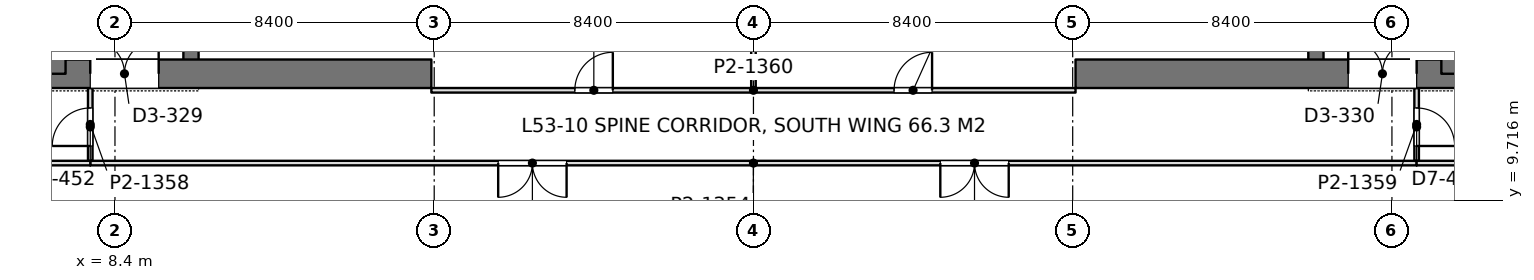
"""IFC4 building model, lengths in metres.
Left out: names, types, materials, properties, quantities, classifications, styles, units other than length and angle.
Written with IfcOpenShell. Run it as: python <this file> out.ifc"""

import sys

from ifc_helpers import new_model, si_unit, direction, frame, frame_2d, origin, place, context, subcontext, project, spatial, rectangle, extrude, element, fill, save


model = new_model("IFC4")
c1 = context("Model", 3, precision=1e-05, world=origin(), true_north=direction((0.0, 1.0)))
c2 = subcontext(c1, "Body", "Model", "MODEL_VIEW")
j1 = project(units=[si_unit("LENGTHUNIT", "METRE"), si_unit("PLANEANGLEUNIT", "RADIAN")], contexts=[c1])
p1 = place(None, origin())
s1 = spatial("IfcSite", under=j1, at=p1, CompositionType="ELEMENT")
p2 = place(p1, origin())
s2 = spatial("IfcBuilding", under=s1, at=p2, CompositionType="ELEMENT")
p3 = place(p2, frame((0.0, 0.0, 232.2)))
s3 = spatial("IfcBuildingStorey", under=s2, at=p3, CompositionType="ELEMENT", Elevation=232.2)
p4 = place(p3, frame((-1.125, 13.05, 0.0), z_axis=(0.0, 0.0, 1.0), x_axis=(1.0, 0.0, 0.0)))
e1 = element("IfcWall", 1, at=p4, inside=s3, PredefinedType="SHEAR", context=c2, shape_type="SweptSolid", body=[
    extrude(rectangle(XDim=17.85, YDim=0.75, at=frame_2d((8.925, 0.0))), origin(), (0.0, 0.0, 1.0), 4.2),
])
p5 = place(p4, frame((8.875, 0.0, 0.0)))
e2 = element("IfcOpeningElement", 2, at=p5, cuts=e1, PredefinedType="OPENING", context=c2, shape_type="SweptSolid", body=[
    extrude(rectangle(XDim=1.8, YDim=2.4, at=frame_2d((0.9, 1.2))), frame((0.0, 0.385, 0.0), z_axis=(0.0, -1.0, 0.0), x_axis=(1.0, 0.0, 0.0)), (0.0, 0.0, 1.0), 0.77),
])
p6 = place(p3, frame((6.9, 13.05, 0.0), z_axis=(0.0, 0.0, 1.0), x_axis=(0.0, 1.0, 0.0)))
e3 = element("IfcWall", 3, at=p6, inside=s3, PredefinedType="SHEAR", context=c2, shape_type="SweptSolid", body=[
    extrude(rectangle(XDim=24.3, YDim=0.4, at=frame_2d((12.15, 0.0))), origin(), (0.0, 0.0, 1.0), 4.2),
])
p7 = place(p6, frame((1.3, 0.0, 0.0)))
e4 = element("IfcOpeningElement", 4, at=p7, cuts=e3, PredefinedType="OPENING", context=c2, shape_type="SweptSolid", body=[
    extrude(rectangle(XDim=1.0, YDim=2.2, at=frame_2d((0.5, 1.1))), frame((0.0, 0.21, 0.0), z_axis=(0.0, -1.0, 0.0), x_axis=(1.0, 0.0, 0.0)), (0.0, 0.0, 1.0), 0.42),
])
p8 = place(p6, frame((22.0, 0.0, 0.0)))
e5 = element("IfcOpeningElement", 5, at=p8, cuts=e3, PredefinedType="OPENING", context=c2, shape_type="SweptSolid", body=[
    extrude(rectangle(XDim=1.0, YDim=2.2, at=frame_2d((0.5, 1.1))), frame((0.0, 0.21, 0.0), z_axis=(0.0, -1.0, 0.0), x_axis=(1.0, 0.0, 0.0)), (0.0, 0.0, 1.0), 0.42),
])
p9 = place(p6, frame((5.55, 0.0, 0.0)))
e6 = element("IfcOpeningElement", 6, at=p9, cuts=e3, PredefinedType="OPENING", context=c2, shape_type="SweptSolid", body=[
    extrude(rectangle(XDim=1.0, YDim=2.2, at=frame_2d((0.5, 1.1))), frame((0.0, 0.21, 0.0), z_axis=(0.0, -1.0, 0.0), x_axis=(1.0, 0.0, 0.0)), (0.0, 0.0, 1.0), 0.42),
])
p10 = place(p6, frame((9.55, 0.0, 0.0)))
e7 = element("IfcOpeningElement", 7, at=p10, cuts=e3, PredefinedType="OPENING", context=c2, shape_type="SweptSolid", body=[
    extrude(rectangle(XDim=1.0, YDim=2.2, at=frame_2d((0.5, 1.1))), frame((0.0, 0.21, 0.0), z_axis=(0.0, -1.0, 0.0), x_axis=(1.0, 0.0, 0.0)), (0.0, 0.0, 1.0), 0.42),
])
p11 = place(p6, frame((12.8, 0.0, 0.0)))
e8 = element("IfcOpeningElement", 8, at=p11, cuts=e3, PredefinedType="OPENING", context=c2, shape_type="SweptSolid", body=[
    extrude(rectangle(XDim=1.1, YDim=2.2, at=frame_2d((0.55, 1.1))), frame((0.0, 0.21, 0.0), z_axis=(0.0, -1.0, 0.0), x_axis=(1.0, 0.0, 0.0)), (0.0, 0.0, 1.0), 0.42),
])
p12 = place(p6, frame((15.538, 0.0, 0.0)))
e9 = element("IfcOpeningElement", 9, at=p12, cuts=e3, PredefinedType="OPENING", context=c2, shape_type="SweptSolid", body=[
    extrude(rectangle(XDim=1.1, YDim=2.2, at=frame_2d((0.55, 1.1))), frame((0.0, 0.21, 0.0), z_axis=(0.0, -1.0, 0.0), x_axis=(1.0, 0.0, 0.0)), (0.0, 0.0, 1.0), 0.42),
])
p13 = place(p6, frame((18.262, 0.0, 0.0)))
e10 = element("IfcOpeningElement", 10, at=p13, cuts=e3, PredefinedType="OPENING", context=c2, shape_type="SweptSolid", body=[
    extrude(rectangle(XDim=1.1, YDim=2.2, at=frame_2d((0.55, 1.1))), frame((0.0, 0.21, 0.0), z_axis=(0.0, -1.0, 0.0), x_axis=(1.0, 0.0, 0.0)), (0.0, 0.0, 1.0), 0.42),
])
p14 = place(p3, frame((10.4, 13.05, 0.0), z_axis=(0.0, 0.0, 1.0), x_axis=(0.0, 1.0, 0.0)))
e11 = element("IfcWall", 11, at=p14, inside=s3, PredefinedType="SHEAR", context=c2, shape_type="SweptSolid", body=[
    extrude(rectangle(XDim=24.3, YDim=0.4, at=frame_2d((12.15, 0.0))), origin(), (0.0, 0.0, 1.0), 4.2),
])
p15 = place(p14, frame((15.75, 0.0, 0.0)))
e12 = element("IfcOpeningElement", 12, at=p15, cuts=e11, PredefinedType="OPENING", context=c2, shape_type="SweptSolid", body=[
    extrude(rectangle(XDim=1.1, YDim=2.2, at=frame_2d((0.55, 1.1))), frame((0.0, 0.21, 0.0), z_axis=(0.0, -1.0, 0.0), x_axis=(1.0, 0.0, 0.0)), (0.0, 0.0, 1.0), 0.42),
])
p16 = place(p14, frame((18.6, 0.0, 0.0)))
e13 = element("IfcOpeningElement", 13, at=p16, cuts=e11, PredefinedType="OPENING", context=c2, shape_type="SweptSolid", body=[
    extrude(rectangle(XDim=1.1, YDim=2.2, at=frame_2d((0.55, 1.1))), frame((0.0, 0.21, 0.0), z_axis=(0.0, -1.0, 0.0), x_axis=(1.0, 0.0, 0.0)), (0.0, 0.0, 1.0), 0.42),
])
p17 = place(p14, frame((21.45, 0.0, 0.0)))
e14 = element("IfcOpeningElement", 14, at=p17, cuts=e11, PredefinedType="OPENING", context=c2, shape_type="SweptSolid", body=[
    extrude(rectangle(XDim=1.1, YDim=2.2, at=frame_2d((0.55, 1.1))), frame((0.0, 0.21, 0.0), z_axis=(0.0, -1.0, 0.0), x_axis=(1.0, 0.0, 0.0)), (0.0, 0.0, 1.0), 0.42),
])
p18 = place(p14, frame((8.65, 0.0, 0.0)))
e15 = element("IfcOpeningElement", 15, at=p18, cuts=e11, PredefinedType="OPENING", context=c2, shape_type="SweptSolid", body=[
    extrude(rectangle(XDim=1.8, YDim=2.4, at=frame_2d((0.9, 1.2))), frame((0.0, 0.21, 0.0), z_axis=(0.0, -1.0, 0.0), x_axis=(1.0, 0.0, 0.0)), (0.0, 0.0, 1.0), 0.42),
])
p19 = place(p3, frame((33.675, 13.05, 0.0), z_axis=(0.0, 0.0, 1.0), x_axis=(1.0, 0.0, 0.0)))
e16 = element("IfcWall", 16, at=p19, inside=s3, PredefinedType="SHEAR", context=c2, shape_type="SweptSolid", body=[
    extrude(rectangle(XDim=17.85, YDim=0.75, at=frame_2d((8.925, 0.0))), origin(), (0.0, 0.0, 1.0), 4.2),
])
p20 = place(p19, frame((7.175, 0.0, 0.0)))
e17 = element("IfcOpeningElement", 17, at=p20, cuts=e16, PredefinedType="OPENING", context=c2, shape_type="SweptSolid", body=[
    extrude(rectangle(XDim=1.8, YDim=2.4, at=frame_2d((0.9, 1.2))), frame((0.0, 0.385, 0.0), z_axis=(0.0, -1.0, 0.0), x_axis=(1.0, 0.0, 0.0)), (0.0, 0.0, 1.0), 0.77),
])
p21 = place(p3, frame((43.5, 13.05, 0.0), z_axis=(0.0, 0.0, 1.0), x_axis=(0.0, 1.0, 0.0)))
e18 = element("IfcWall", 18, at=p21, inside=s3, PredefinedType="SHEAR", context=c2, shape_type="SweptSolid", body=[
    extrude(rectangle(XDim=24.3, YDim=0.4, at=frame_2d((12.15, 0.0))), origin(), (0.0, 0.0, 1.0), 4.2),
])
p22 = place(p21, frame((1.3, 0.0, 0.0)))
e19 = element("IfcOpeningElement", 19, at=p22, cuts=e18, PredefinedType="OPENING", context=c2, shape_type="SweptSolid", body=[
    extrude(rectangle(XDim=1.0, YDim=2.2, at=frame_2d((0.5, 1.1))), frame((0.0, 0.21, 0.0), z_axis=(0.0, -1.0, 0.0), x_axis=(1.0, 0.0, 0.0)), (0.0, 0.0, 1.0), 0.42),
])
p23 = place(p21, frame((22.0, 0.0, 0.0)))
e20 = element("IfcOpeningElement", 20, at=p23, cuts=e18, PredefinedType="OPENING", context=c2, shape_type="SweptSolid", body=[
    extrude(rectangle(XDim=1.0, YDim=2.2, at=frame_2d((0.5, 1.1))), frame((0.0, 0.21, 0.0), z_axis=(0.0, -1.0, 0.0), x_axis=(1.0, 0.0, 0.0)), (0.0, 0.0, 1.0), 0.42),
])
p24 = place(p21, frame((5.55, 0.0, 0.0)))
e21 = element("IfcOpeningElement", 21, at=p24, cuts=e18, PredefinedType="OPENING", context=c2, shape_type="SweptSolid", body=[
    extrude(rectangle(XDim=1.0, YDim=2.2, at=frame_2d((0.5, 1.1))), frame((0.0, 0.21, 0.0), z_axis=(0.0, -1.0, 0.0), x_axis=(1.0, 0.0, 0.0)), (0.0, 0.0, 1.0), 0.42),
])
p25 = place(p21, frame((9.55, 0.0, 0.0)))
e22 = element("IfcOpeningElement", 22, at=p25, cuts=e18, PredefinedType="OPENING", context=c2, shape_type="SweptSolid", body=[
    extrude(rectangle(XDim=1.0, YDim=2.2, at=frame_2d((0.5, 1.1))), frame((0.0, 0.21, 0.0), z_axis=(0.0, -1.0, 0.0), x_axis=(1.0, 0.0, 0.0)), (0.0, 0.0, 1.0), 0.42),
])
p26 = place(p21, frame((12.8, 0.0, 0.0)))
e23 = element("IfcOpeningElement", 23, at=p26, cuts=e18, PredefinedType="OPENING", context=c2, shape_type="SweptSolid", body=[
    extrude(rectangle(XDim=1.1, YDim=2.2, at=frame_2d((0.55, 1.1))), frame((0.0, 0.21, 0.0), z_axis=(0.0, -1.0, 0.0), x_axis=(1.0, 0.0, 0.0)), (0.0, 0.0, 1.0), 0.42),
])
p27 = place(p21, frame((15.538, 0.0, 0.0)))
e24 = element("IfcOpeningElement", 24, at=p27, cuts=e18, PredefinedType="OPENING", context=c2, shape_type="SweptSolid", body=[
    extrude(rectangle(XDim=1.1, YDim=2.2, at=frame_2d((0.55, 1.1))), frame((0.0, 0.21, 0.0), z_axis=(0.0, -1.0, 0.0), x_axis=(1.0, 0.0, 0.0)), (0.0, 0.0, 1.0), 0.42),
])
p28 = place(p21, frame((18.262, 0.0, 0.0)))
e25 = element("IfcOpeningElement", 25, at=p28, cuts=e18, PredefinedType="OPENING", context=c2, shape_type="SweptSolid", body=[
    extrude(rectangle(XDim=1.1, YDim=2.2, at=frame_2d((0.55, 1.1))), frame((0.0, 0.21, 0.0), z_axis=(0.0, -1.0, 0.0), x_axis=(1.0, 0.0, 0.0)), (0.0, 0.0, 1.0), 0.42),
])
p29 = place(p3, frame((40.0, 13.05, 0.0), z_axis=(0.0, 0.0, 1.0), x_axis=(0.0, 1.0, 0.0)))
e26 = element("IfcWall", 26, at=p29, inside=s3, PredefinedType="SHEAR", context=c2, shape_type="SweptSolid", body=[
    extrude(rectangle(XDim=24.3, YDim=0.4, at=frame_2d((12.15, 0.0))), origin(), (0.0, 0.0, 1.0), 4.2),
])
p30 = place(p29, frame((15.75, 0.0, 0.0)))
e27 = element("IfcOpeningElement", 27, at=p30, cuts=e26, PredefinedType="OPENING", context=c2, shape_type="SweptSolid", body=[
    extrude(rectangle(XDim=1.1, YDim=2.2, at=frame_2d((0.55, 1.1))), frame((0.0, 0.21, 0.0), z_axis=(0.0, -1.0, 0.0), x_axis=(1.0, 0.0, 0.0)), (0.0, 0.0, 1.0), 0.42),
])
p31 = place(p29, frame((18.6, 0.0, 0.0)))
e28 = element("IfcOpeningElement", 28, at=p31, cuts=e26, PredefinedType="OPENING", context=c2, shape_type="SweptSolid", body=[
    extrude(rectangle(XDim=1.1, YDim=2.2, at=frame_2d((0.55, 1.1))), frame((0.0, 0.21, 0.0), z_axis=(0.0, -1.0, 0.0), x_axis=(1.0, 0.0, 0.0)), (0.0, 0.0, 1.0), 0.42),
])
p32 = place(p29, frame((21.45, 0.0, 0.0)))
e29 = element("IfcOpeningElement", 29, at=p32, cuts=e26, PredefinedType="OPENING", context=c2, shape_type="SweptSolid", body=[
    extrude(rectangle(XDim=1.1, YDim=2.2, at=frame_2d((0.55, 1.1))), frame((0.0, 0.21, 0.0), z_axis=(0.0, -1.0, 0.0), x_axis=(1.0, 0.0, 0.0)), (0.0, 0.0, 1.0), 0.42),
])
p33 = place(p29, frame((8.65, 0.0, 0.0)))
e30 = element("IfcOpeningElement", 30, at=p33, cuts=e26, PredefinedType="OPENING", context=c2, shape_type="SweptSolid", body=[
    extrude(rectangle(XDim=1.8, YDim=2.4, at=frame_2d((0.9, 1.2))), frame((0.0, 0.21, 0.0), z_axis=(0.0, -1.0, 0.0), x_axis=(1.0, 0.0, 0.0)), (0.0, 0.0, 1.0), 0.42),
])
p34 = place(p3, frame((7.748, 10.7, 0.0), z_axis=(0.0, 0.0, 1.0), x_axis=(1.0, 0.0, 0.0)))
e31 = element("IfcWall", 31, at=p34, inside=s3, PredefinedType="PARTITIONING", context=c2, shape_type="SweptSolid", body=[
    extrude(rectangle(XDim=34.904, YDim=0.12, at=frame_2d((17.452, 0.0))), origin(), (0.0, 0.0, 1.0), 3.55),
])
p35 = place(p34, frame((10.735, 0.0, 0.0)))
e32 = element("IfcOpeningElement", 32, at=p35, cuts=e31, PredefinedType="OPENING", context=c2, shape_type="SweptSolid", body=[
    extrude(rectangle(XDim=1.8, YDim=2.2, at=frame_2d((0.9, 1.1))), frame((0.0, 0.07, 0.0), z_axis=(0.0, -1.0, 0.0), x_axis=(1.0, 0.0, 0.0)), (0.0, 0.0, 1.0), 0.14),
])
p36 = place(p34, frame((22.369, 0.0, 0.0)))
e33 = element("IfcOpeningElement", 33, at=p36, cuts=e31, PredefinedType="OPENING", context=c2, shape_type="SweptSolid", body=[
    extrude(rectangle(XDim=1.8, YDim=2.2, at=frame_2d((0.9, 1.1))), frame((0.0, 0.07, 0.0), z_axis=(0.0, -1.0, 0.0), x_axis=(1.0, 0.0, 0.0)), (0.0, 0.0, 1.0), 0.14),
])
p37 = place(p3, frame((7.75, 10.758, 0.0), z_axis=(0.0, 0.0, 1.0), x_axis=(0.0, 1.0, 0.0)))
e34 = element("IfcWall", 34, at=p37, inside=s3, PredefinedType="PARTITIONING", context=c2, shape_type="SweptSolid", body=[
    extrude(rectangle(XDim=1.918, YDim=0.12, at=frame_2d((0.959, 0.0))), origin(), (0.0, 0.0, 1.0), 4.05),
])
p38 = place(p37, frame((0.392, 0.0, 0.0)))
e35 = element("IfcOpeningElement", 35, at=p38, cuts=e34, PredefinedType="OPENING", context=c2, shape_type="SweptSolid", body=[
    extrude(rectangle(XDim=1.0, YDim=2.4, at=frame_2d((0.5, 1.2))), frame((0.0, 0.07, 0.0), z_axis=(0.0, -1.0, 0.0), x_axis=(1.0, 0.0, 0.0)), (0.0, 0.0, 1.0), 0.14),
])
p39 = place(p3, frame((42.65, 10.758, 0.0), z_axis=(0.0, 0.0, 1.0), x_axis=(0.0, 1.0, 0.0)))
e36 = element("IfcWall", 36, at=p39, inside=s3, PredefinedType="PARTITIONING", context=c2, shape_type="SweptSolid", body=[
    extrude(rectangle(XDim=1.918, YDim=0.12, at=frame_2d((0.959, 0.0))), origin(), (0.0, 0.0, 1.0), 4.05),
])
p40 = place(p39, frame((0.392, 0.0, 0.0)))
e37 = element("IfcOpeningElement", 37, at=p40, cuts=e36, PredefinedType="OPENING", context=c2, shape_type="SweptSolid", body=[
    extrude(rectangle(XDim=1.0, YDim=2.4, at=frame_2d((0.5, 1.2))), frame((0.0, 0.07, 0.0), z_axis=(0.0, -1.0, 0.0), x_axis=(1.0, 0.0, 0.0)), (0.0, 0.0, 1.0), 0.14),
])
for number, where, z_axis, x_axis in (
    (38, (1.2, 10.7, 0.0), (0.0, 0.0, 1.0), (1.0, 0.0, 0.0)),
    (39, (42.648, 10.7, 0.0), (0.0, 0.0, 1.0), (1.0, 0.0, 0.0)),
):
    element("IfcWall", number, at=place(p3, frame(where, z_axis=z_axis, x_axis=x_axis)), inside=s3, PredefinedType="PARTITIONING", context=c2, shape_type="SweptSolid", body=[
        extrude(rectangle(XDim=6.552, YDim=0.12, at=frame_2d((3.276, 0.0))), origin(), (0.0, 0.0, 1.0), 4.05),
    ])
p41 = place(p3, frame((25.2, 12.658, 0.0), z_axis=(0.0, 0.0, 1.0), x_axis=(0.0, 1.0, 0.0)))
e40 = element("IfcWall", 40, at=p41, inside=s3, PredefinedType="PARTITIONING", context=c2, shape_type="SweptSolid", body=[
    extrude(rectangle(XDim=3.593, YDim=0.12, at=frame_2d((1.796, 0.0))), origin(), (0.0, 0.0, 1.0), 3.55),
])
p42 = place(p3, frame((16.725, 12.615, 0.0), z_axis=(0.0, 0.0, 1.0), x_axis=(1.0, 0.0, 0.0)))
e41 = element("IfcWall", 41, at=p42, inside=s3, PredefinedType="PARTITIONING", context=c2, shape_type="SweptSolid", body=[
    extrude(rectangle(XDim=16.95, YDim=0.12, at=frame_2d((8.475, 0.0))), origin(), (0.0, 0.0, 1.0), 3.55),
])
p43 = place(p42, frame((3.775, 0.0, 0.0)))
e42 = element("IfcOpeningElement", 42, at=p43, cuts=e41, PredefinedType="OPENING", context=c2, shape_type="SweptSolid", body=[
    extrude(rectangle(XDim=1.0, YDim=2.4, at=frame_2d((0.5, 1.2))), frame((0.0, 0.07, 0.0), z_axis=(0.0, -1.0, 0.0), x_axis=(1.0, 0.0, 0.0)), (0.0, 0.0, 1.0), 0.14),
])
p44 = place(p42, frame((12.175, 0.0, 0.0)))
e43 = element("IfcOpeningElement", 43, at=p44, cuts=e41, PredefinedType="OPENING", context=c2, shape_type="SweptSolid", body=[
    extrude(rectangle(XDim=1.0, YDim=2.4, at=frame_2d((0.5, 1.2))), frame((0.0, 0.07, 0.0), z_axis=(0.0, -1.0, 0.0), x_axis=(1.0, 0.0, 0.0)), (0.0, 0.0, 1.0), 0.14),
])
p45 = place(p5, origin())
e44 = element("IfcDoor", 44, at=p45, inside=s3, OperationType="DOUBLE_DOOR_SINGLE_SWING", PredefinedType="DOOR", context=c2, shape_type="SweptSolid", body=[
    extrude(rectangle(XDim=1.8, YDim=2.4, at=frame_2d((0.9, 1.2))), frame((0.0, 0.025, 0.0), z_axis=(0.0, -1.0, 0.0), x_axis=(1.0, 0.0, 0.0)), (0.0, 0.0, 1.0), 0.05),
])
fill(e2, e44)
p46 = place(p20, origin())
e45 = element("IfcDoor", 45, at=p46, inside=s3, OperationType="DOUBLE_DOOR_SINGLE_SWING", PredefinedType="DOOR", context=c2, shape_type="SweptSolid", body=[
    extrude(rectangle(XDim=1.8, YDim=2.4, at=frame_2d((0.9, 1.2))), frame((0.0, 0.025, 0.0), z_axis=(0.0, -1.0, 0.0), x_axis=(1.0, 0.0, 0.0)), (0.0, 0.0, 1.0), 0.05),
])
fill(e17, e45)
p47 = place(p35, frame((1.8, 0.0, 0.0), z_axis=(0.0, 0.0, 1.0), x_axis=(-1.0, 0.0, 0.0)))
e46 = element("IfcDoor", 46, at=p47, inside=s3, OperationType="DOUBLE_DOOR_SINGLE_SWING", PredefinedType="DOOR", context=c2, shape_type="SweptSolid", body=[
    extrude(rectangle(XDim=1.8, YDim=2.2, at=frame_2d((0.9, 1.1))), frame((0.0, 0.025, 0.0), z_axis=(0.0, -1.0, 0.0), x_axis=(1.0, 0.0, 0.0)), (0.0, 0.0, 1.0), 0.05),
])
fill(e32, e46)
p48 = place(p36, frame((1.8, 0.0, 0.0), z_axis=(0.0, 0.0, 1.0), x_axis=(-1.0, 0.0, 0.0)))
e47 = element("IfcDoor", 47, at=p48, inside=s3, OperationType="DOUBLE_DOOR_SINGLE_SWING", PredefinedType="DOOR", context=c2, shape_type="SweptSolid", body=[
    extrude(rectangle(XDim=1.8, YDim=2.2, at=frame_2d((0.9, 1.1))), frame((0.0, 0.025, 0.0), z_axis=(0.0, -1.0, 0.0), x_axis=(1.0, 0.0, 0.0)), (0.0, 0.0, 1.0), 0.05),
])
fill(e33, e47)
p49 = place(p38, origin())
e48 = element("IfcDoor", 48, at=p49, inside=s3, OperationType="SINGLE_SWING_LEFT", PredefinedType="DOOR", context=c2, shape_type="SweptSolid", body=[
    extrude(rectangle(XDim=1.0, YDim=2.4, at=frame_2d((0.5, 1.2))), frame((0.0, 0.025, 0.0), z_axis=(0.0, -1.0, 0.0), x_axis=(1.0, 0.0, 0.0)), (0.0, 0.0, 1.0), 0.05),
])
fill(e35, e48)
p50 = place(p40, frame((1.0, 0.0, 0.0), z_axis=(0.0, 0.0, 1.0), x_axis=(-1.0, 0.0, 0.0)))
e49 = element("IfcDoor", 49, at=p50, inside=s3, OperationType="SINGLE_SWING_RIGHT", PredefinedType="DOOR", context=c2, shape_type="SweptSolid", body=[
    extrude(rectangle(XDim=1.0, YDim=2.4, at=frame_2d((0.5, 1.2))), frame((0.0, 0.025, 0.0), z_axis=(0.0, -1.0, 0.0), x_axis=(1.0, 0.0, 0.0)), (0.0, 0.0, 1.0), 0.05),
])
fill(e37, e49)
p51 = place(p43, origin())
e50 = element("IfcDoor", 50, at=p51, inside=s3, OperationType="SINGLE_SWING_RIGHT", PredefinedType="DOOR", context=c2, shape_type="SweptSolid", body=[
    extrude(rectangle(XDim=1.0, YDim=2.4, at=frame_2d((0.5, 1.2))), frame((0.0, 0.025, 0.0), z_axis=(0.0, -1.0, 0.0), x_axis=(1.0, 0.0, 0.0)), (0.0, 0.0, 1.0), 0.05),
])
fill(e42, e50)
p52 = place(p44, origin())
e51 = element("IfcDoor", 51, at=p52, inside=s3, OperationType="SINGLE_SWING_RIGHT", PredefinedType="DOOR", context=c2, shape_type="SweptSolid", body=[
    extrude(rectangle(XDim=1.0, YDim=2.4, at=frame_2d((0.5, 1.2))), frame((0.0, 0.025, 0.0), z_axis=(0.0, -1.0, 0.0), x_axis=(1.0, 0.0, 0.0)), (0.0, 0.0, 1.0), 0.05),
])
fill(e43, e51)
save(model, sys.argv[1])
